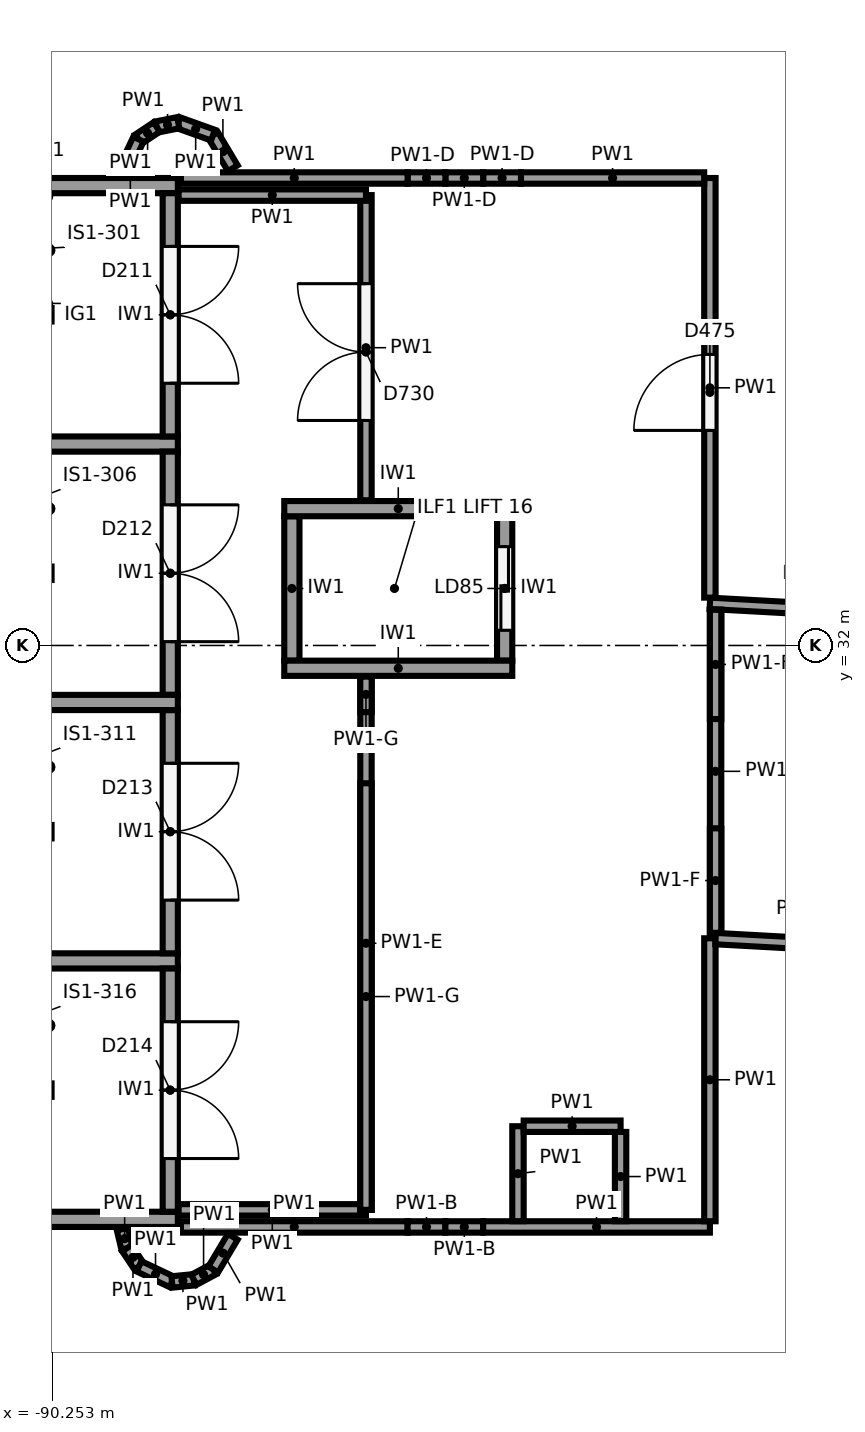
"""IFC4 building model, lengths in metres.
Left out: names, types, materials, properties, quantities, classifications, styles, units other than length and angle.
Written with IfcOpenShell. Run it as: python <this file> out.ifc"""

import sys

from ifc_helpers import new_model, si_unit, direction, frame, frame_2d, origin, origin_2d, place, context, subcontext, project, spatial, rectangle, circle, extrude, element, fill, save


model = new_model("IFC4")
c1 = context("Model", 3, precision=1e-05, world=origin(), true_north=direction((0.0, 1.0)))
c2 = subcontext(c1, "Body", "Model", "MODEL_VIEW")
j1 = project(units=[si_unit("LENGTHUNIT", "METRE"), si_unit("PLANEANGLEUNIT", "RADIAN")], contexts=[c1])
p1 = place(None, origin())
s1 = spatial("IfcSite", under=j1, at=p1, CompositionType="ELEMENT")
p2 = place(p1, origin())
s2 = spatial("IfcBuilding", under=s1, at=p2, CompositionType="ELEMENT")
p3 = place(p2, frame((0.0, 0.0, -4.0)))
s3 = spatial("IfcBuildingStorey", under=s2, at=p3, CompositionType="ELEMENT", Elevation=-4.0)
p4 = place(p3, frame((-84.941, 30.404, -1.2), z_axis=(0.0, 0.0, 1.0), x_axis=(1.0, 0.0, 0.0)))
e1 = element("IfcColumn", 1, at=p4, inside=s3, PredefinedType="COLUMN", context=c2, shape_type="SweptSolid", body=[
    extrude(circle(Radius=0.6, at=origin_2d()), origin(), (0.0, 0.0, 1.0), 5.2),
])
for number, where, z_axis, x_axis in (
    (2, (-97.6, 38.05, -1.2), (0.0, 0.0, 1.0), (1.0, 0.0, 0.0)),
    (3, (-97.6, 31.25, -1.2), (0.0, 0.0, 1.0), (1.0, 0.0, 0.0)),
    (4, (-97.6, 24.45, -1.2), (0.0, 0.0, 1.0), (1.0, 0.0, 0.0)),
    (5, (-97.6, 34.65, -1.2), (0.0, 0.0, 1.0), (1.0, 0.0, 0.0)),
    (6, (-97.6, 27.85, -1.2), (0.0, 0.0, 1.0), (1.0, 0.0, 0.0)),
):
    element("IfcWall", number, at=place(p3, frame(where, z_axis=z_axis, x_axis=x_axis)), inside=s3, PredefinedType="SHEAR", context=c2, shape_type="SweptSolid", body=[
        extrude(rectangle(XDim=9.0, YDim=0.2, at=frame_2d((4.5, 0.0))), origin(), (0.0, 0.0, 1.0), 4.8),
    ])
p5 = place(p3, frame((-88.7, 37.95, -1.2), z_axis=(0.0, 0.0, 1.0), x_axis=(0.0, -1.0, 0.0)))
e7 = element("IfcWall", 7, at=p5, inside=s3, PredefinedType="SHEAR", context=c2, shape_type="SweptSolid", body=[
    extrude(rectangle(XDim=3.2, YDim=0.2, at=frame_2d((1.6, 0.0))), origin(), (0.0, 0.0, 1.0), 4.8),
])
p6 = place(p5, frame((0.7, 0.0, 1.2)))
e8 = element("IfcOpeningElement", 8, at=p6, cuts=e7, PredefinedType="OPENING", context=c2, shape_type="SweptSolid", body=[
    extrude(rectangle(XDim=1.8, YDim=2.1, at=frame_2d((0.9, 1.05))), frame((0.0, 0.11, 0.0), z_axis=(0.0, -1.0, 0.0), x_axis=(1.0, 0.0, 0.0)), (0.0, 0.0, 1.0), 0.22),
])
p7 = place(p3, frame((-88.7, 34.55, -1.2), z_axis=(0.0, 0.0, 1.0), x_axis=(0.0, -1.0, 0.0)))
e9 = element("IfcWall", 9, at=p7, inside=s3, PredefinedType="SHEAR", context=c2, shape_type="SweptSolid", body=[
    extrude(rectangle(XDim=3.2, YDim=0.2, at=frame_2d((1.6, 0.0))), origin(), (0.0, 0.0, 1.0), 4.8),
])
p8 = place(p7, frame((0.7, 0.0, 1.2)))
e10 = element("IfcOpeningElement", 10, at=p8, cuts=e9, PredefinedType="OPENING", context=c2, shape_type="SweptSolid", body=[
    extrude(rectangle(XDim=1.8, YDim=2.1, at=frame_2d((0.9, 1.05))), frame((0.0, 0.11, 0.0), z_axis=(0.0, -1.0, 0.0), x_axis=(1.0, 0.0, 0.0)), (0.0, 0.0, 1.0), 0.22),
])
p9 = place(p3, frame((-88.7, 31.15, -1.2), z_axis=(0.0, 0.0, 1.0), x_axis=(0.0, -1.0, 0.0)))
e11 = element("IfcWall", 11, at=p9, inside=s3, PredefinedType="SHEAR", context=c2, shape_type="SweptSolid", body=[
    extrude(rectangle(XDim=3.2, YDim=0.2, at=frame_2d((1.6, 0.0))), origin(), (0.0, 0.0, 1.0), 4.8),
])
p10 = place(p9, frame((0.7, 0.0, 1.2)))
e12 = element("IfcOpeningElement", 12, at=p10, cuts=e11, PredefinedType="OPENING", context=c2, shape_type="SweptSolid", body=[
    extrude(rectangle(XDim=1.8, YDim=2.1, at=frame_2d((0.9, 1.05))), frame((0.0, 0.11, 0.0), z_axis=(0.0, -1.0, 0.0), x_axis=(1.0, 0.0, 0.0)), (0.0, 0.0, 1.0), 0.22),
])
p11 = place(p3, frame((-88.7, 27.75, -1.2), z_axis=(0.0, 0.0, 1.0), x_axis=(0.0, -1.0, 0.0)))
e13 = element("IfcWall", 13, at=p11, inside=s3, PredefinedType="SHEAR", context=c2, shape_type="SweptSolid", body=[
    extrude(rectangle(XDim=3.2, YDim=0.2, at=frame_2d((1.6, 0.0))), origin(), (0.0, 0.0, 1.0), 4.8),
])
p12 = place(p11, frame((0.7, 0.0, 1.2)))
e14 = element("IfcOpeningElement", 14, at=p12, cuts=e13, PredefinedType="OPENING", context=c2, shape_type="SweptSolid", body=[
    extrude(rectangle(XDim=1.8, YDim=2.1, at=frame_2d((0.9, 1.05))), frame((0.0, 0.11, 0.0), z_axis=(0.0, -1.0, 0.0), x_axis=(1.0, 0.0, 0.0)), (0.0, 0.0, 1.0), 0.22),
])
for number, where, z_axis, x_axis in (
    (15, (-87.2, 33.8, -1.2), (0.0, 0.0, 1.0), (1.0, 0.0, 0.0)),
    (16, (-87.2, 31.7, -1.2), (0.0, 0.0, 1.0), (1.0, 0.0, 0.0)),
):
    element("IfcWall", number, at=place(p3, frame(where, z_axis=z_axis, x_axis=x_axis)), inside=s3, PredefinedType="SHEAR", context=c2, shape_type="SweptSolid", body=[
        extrude(rectangle(XDim=3.0, YDim=0.2, at=frame_2d((1.5, 0.0))), origin(), (0.0, 0.0, 1.0), 4.8),
    ])
p13 = place(p3, frame((-87.1, 33.7, -1.2), z_axis=(0.0, 0.0, 1.0), x_axis=(0.0, -1.0, 0.0)))
e17 = element("IfcWall", 17, at=p13, inside=s3, PredefinedType="SHEAR", context=c2, shape_type="SweptSolid", body=[
    extrude(rectangle(XDim=1.9, YDim=0.2, at=frame_2d((0.95, 0.0))), origin(), (0.0, 0.0, 1.0), 4.8),
])
p14 = place(p3, frame((-84.3, 33.7, -1.2), z_axis=(0.0, 0.0, 1.0), x_axis=(0.0, -1.0, 0.0)))
e18 = element("IfcWall", 18, at=p14, inside=s3, PredefinedType="SHEAR", context=c2, shape_type="SweptSolid", body=[
    extrude(rectangle(XDim=1.9, YDim=0.2, at=frame_2d((0.95, 0.0))), origin(), (0.0, 0.0, 1.0), 4.8),
])
p15 = place(p14, frame((0.4, 0.0, 1.2)))
e19 = element("IfcOpeningElement", 19, at=p15, cuts=e18, PredefinedType="OPENING", context=c2, shape_type="SweptSolid", body=[
    extrude(rectangle(XDim=1.1, YDim=2.1, at=frame_2d((0.55, 1.05))), frame((0.0, 0.11, 0.0), z_axis=(0.0, -1.0, 0.0), x_axis=(1.0, 0.0, 0.0)), (0.0, 0.0, 1.0), 0.22),
])
p16 = place(p3, frame((-79.122, 32.418, 0.0), z_axis=(0.0, 0.0, 1.0), x_axis=(-0.998497362752, 0.05479978629, 0.0)))
e20 = element("IfcWall", 20, at=p16, inside=s3, PredefinedType="PARTITIONING", context=c2, shape_type="SweptSolid", body=[
    extrude(rectangle(XDim=2.481, YDim=0.15, at=frame_2d((1.241, 0.0))), origin(), (0.0, 0.0, 1.0), 3.6),
])
p17 = place(p3, frame((-81.6, 32.629, 0.0), z_axis=(0.0, 0.0, 1.0), x_axis=(0.0, 1.0, 0.0)))
e21 = element("IfcWall", 21, at=p17, inside=s3, PredefinedType="PARTITIONING", context=c2, shape_type="SweptSolid", body=[
    extrude(rectangle(XDim=5.521, YDim=0.15, at=frame_2d((2.76, 0.0))), origin(), (0.0, 0.0, 1.0), 3.6),
])
p18 = place(p17, frame((2.2, 0.0, 0.0)))
e22 = element("IfcOpeningElement", 22, at=p18, cuts=e21, PredefinedType="OPENING", context=c2, shape_type="SweptSolid", body=[
    extrude(rectangle(XDim=1.0, YDim=2.1, at=frame_2d((0.5, 1.05))), frame((0.0, 0.085, 0.0), z_axis=(0.0, -1.0, 0.0), x_axis=(1.0, 0.0, 0.0)), (0.0, 0.0, 1.0), 0.17),
])
p19 = place(p3, frame((-81.675, 38.15, 0.0), z_axis=(0.0, 0.0, 1.0), x_axis=(-1.0, 0.0, 0.0)))
e23 = element("IfcWall", 23, at=p19, inside=s3, PredefinedType="PARTITIONING", context=c2, shape_type="SweptSolid", body=[
    extrude(rectangle(XDim=2.411, YDim=0.15, at=frame_2d((1.205, 0.0))), origin(), (0.0, 0.0, 1.0), 3.6),
])
p20 = place(p3, frame((-84.086, 38.15, 0.0), z_axis=(0.0, 0.0, 1.0), x_axis=(-1.0, 0.0, 0.0)))
e24 = element("IfcWall", 24, at=p20, inside=s3, PredefinedType="PARTITIONING", context=c2, shape_type="SweptSolid", body=[
    extrude(rectangle(XDim=0.497, YDim=0.15, at=frame_2d((0.249, 0.0))), origin(), (0.0, 0.0, 1.0), 2.3),
])
for number, where, z_axis, x_axis in (
    (25, (-84.583, 38.15, 0.0), (0.0, 0.0, 1.0), (-1.0, 0.0, 0.0)),
    (26, (-85.08, 38.15, 0.0), (0.0, 0.0, 1.0), (-1.0, 0.0, 0.0)),
):
    element("IfcWall", number, at=place(p3, frame(where, z_axis=z_axis, x_axis=x_axis)), inside=s3, PredefinedType="PARTITIONING", context=c2, shape_type="SweptSolid", body=[
        extrude(rectangle(XDim=0.497, YDim=0.15, at=frame_2d((0.249, 0.0))), origin(), (0.0, 0.0, 1.0), 2.3),
    ])
for number, where, z_axis, x_axis in (
    (27, (-85.577, 38.15, 0.0), (0.0, 0.0, 1.0), (-1.0, 0.0, 0.0)),
    (28, (-88.56, 24.35, 0.0), (0.0, 0.0, 1.0), (1.0, 0.0, 0.0)),
):
    element("IfcWall", number, at=place(p3, frame(where, z_axis=z_axis, x_axis=x_axis)), inside=s3, PredefinedType="PARTITIONING", context=c2, shape_type="SweptSolid", body=[
        extrude(rectangle(XDim=2.983, YDim=0.15, at=frame_2d((1.491, 0.0))), origin(), (0.0, 0.0, 1.0), 3.6),
    ])
for number, where, z_axis, x_axis in (
    (29, (-85.577, 24.35, 0.0), (0.0, 0.0, 1.0), (1.0, 0.0, 0.0)),
    (30, (-85.08, 24.35, 0.0), (0.0, 0.0, 1.0), (1.0, 0.0, 0.0)),
):
    element("IfcWall", number, at=place(p3, frame(where, z_axis=z_axis, x_axis=x_axis)), inside=s3, PredefinedType="PARTITIONING", context=c2, shape_type="SweptSolid", body=[
        extrude(rectangle(XDim=0.497, YDim=0.15, at=frame_2d((0.249, 0.0))), origin(), (0.0, 0.0, 1.0), 2.5),
    ])
p21 = place(p3, frame((-84.583, 24.35, 0.0), z_axis=(0.0, 0.0, 1.0), x_axis=(1.0, 0.0, 0.0)))
e31 = element("IfcWall", 31, at=p21, inside=s3, PredefinedType="PARTITIONING", context=c2, shape_type="SweptSolid", body=[
    extrude(rectangle(XDim=2.983, YDim=0.15, at=frame_2d((1.491, 0.0))), origin(), (0.0, 0.0, 1.0), 3.6),
])
p22 = place(p3, frame((-81.6, 24.425, 0.0), z_axis=(0.0, 0.0, 1.0), x_axis=(0.0, 1.0, 0.0)))
e32 = element("IfcWall", 32, at=p22, inside=s3, PredefinedType="PARTITIONING", context=c2, shape_type="SweptSolid", body=[
    extrude(rectangle(XDim=3.723, YDim=0.15, at=frame_2d((1.861, 0.0))), origin(), (0.0, 0.0, 1.0), 3.6),
])
p23 = place(p3, frame((-81.525, 28.144, 0.0), z_axis=(0.0, 0.0, 1.0), x_axis=(0.998497253929, -0.054801769103, 0.0)))
e33 = element("IfcWall", 33, at=p23, inside=s3, PredefinedType="PARTITIONING", context=c2, shape_type="SweptSolid", body=[
    extrude(rectangle(XDim=2.165, YDim=0.15, at=frame_2d((1.083, 0.0))), origin(), (0.0, 0.0, 1.0), 3.6),
])
p24 = place(p3, frame((-84.125, 25.675, 0.0), z_axis=(0.0, 0.0, 1.0), x_axis=(0.0, -1.0, 0.0)))
e34 = element("IfcWall", 34, at=p24, inside=s3, PredefinedType="PARTITIONING", context=c2, shape_type="SweptSolid", body=[
    extrude(rectangle(XDim=1.249, YDim=0.15, at=frame_2d((0.625, 0.0))), origin(), (0.0, 0.0, 1.0), 3.6),
])
p25 = place(p3, frame((-82.775, 24.426, 0.0), z_axis=(0.0, 0.0, 1.0), x_axis=(0.0, 1.0, 0.0)))
e35 = element("IfcWall", 35, at=p25, inside=s3, PredefinedType="PARTITIONING", context=c2, shape_type="SweptSolid", body=[
    extrude(rectangle(XDim=1.174, YDim=0.15, at=frame_2d((0.587, 0.0))), origin(), (0.0, 0.0, 1.0), 3.6),
])
p26 = place(p3, frame((-82.775, 25.675, 0.0), z_axis=(0.0, 0.0, 1.0), x_axis=(-1.0, 0.0, 0.0)))
e36 = element("IfcWall", 36, at=p26, inside=s3, PredefinedType="PARTITIONING", context=c2, shape_type="SweptSolid", body=[
    extrude(rectangle(XDim=1.275, YDim=0.15, at=frame_2d((0.638, 0.0))), origin(), (0.0, 0.0, 1.0), 3.6),
])
p27 = place(p3, frame((-88.59, 24.575, 0.0), z_axis=(0.0, 0.0, 1.0), x_axis=(1.0, 0.0, 0.0)))
e37 = element("IfcWall", 37, at=p27, inside=s3, PredefinedType="PARTITIONING", context=c2, shape_type="SweptSolid", body=[
    extrude(rectangle(XDim=2.465, YDim=0.15, at=frame_2d((1.232, 0.0))), origin(), (0.0, 0.0, 1.0), 3.6),
])
p28 = place(p3, frame((-86.125, 24.575, 0.0), z_axis=(0.0, 0.0, 1.0), x_axis=(0.0, 1.0, 0.0)))
e38 = element("IfcWall", 38, at=p28, inside=s3, PredefinedType="PARTITIONING", context=c2, shape_type="SweptSolid", body=[
    extrude(rectangle(XDim=7.015, YDim=0.15, at=frame_2d((3.508, 0.0))), origin(), (0.0, 0.0, 1.0), 2.85),
])
p29 = place(p3, frame((-86.125, 24.575, 2.85), z_axis=(0.0, 0.0, 1.0), x_axis=(0.0, 1.0, 0.0)))
e39 = element("IfcWall", 39, at=p29, inside=s3, PredefinedType="PARTITIONING", context=c2, shape_type="SweptSolid", body=[
    extrude(rectangle(XDim=5.612, YDim=0.15, at=frame_2d((2.806, 0.0))), origin(), (0.0, 0.0, 1.0), 0.75),
])
p30 = place(p3, frame((-86.125, 31.122, 2.85), z_axis=(0.0, 0.0, 1.0), x_axis=(0.0, 1.0, 0.0)))
e40 = element("IfcWall", 40, at=p30, inside=s3, PredefinedType="PARTITIONING", context=c2, shape_type="SweptSolid", body=[
    extrude(rectangle(XDim=0.468, YDim=0.15, at=frame_2d((0.234, 0.0))), origin(), (0.0, 0.0, 1.0), 0.75),
])
p31 = place(p3, frame((-86.125, 33.91, 0.0), z_axis=(0.0, 0.0, 1.0), x_axis=(0.0, 1.0, 0.0)))
e41 = element("IfcWall", 41, at=p31, inside=s3, PredefinedType="PARTITIONING", context=c2, shape_type="SweptSolid", body=[
    extrude(rectangle(XDim=4.015, YDim=0.15, at=frame_2d((2.008, 0.0))), origin(), (0.0, 0.0, 1.0), 3.6),
])
p32 = place(p31, frame((1.05, 0.0, 0.0)))
e42 = element("IfcOpeningElement", 42, at=p32, cuts=e41, PredefinedType="OPENING", context=c2, shape_type="SweptSolid", body=[
    extrude(rectangle(XDim=1.8, YDim=2.1, at=frame_2d((0.9, 1.05))), frame((0.0, 0.085, 0.0), z_axis=(0.0, -1.0, 0.0), x_axis=(1.0, 0.0, 0.0)), (0.0, 0.0, 1.0), 0.17),
])
p33 = place(p3, frame((-86.125, 37.925, 0.0), z_axis=(0.0, 0.0, 1.0), x_axis=(-1.0, 0.0, 0.0)))
e43 = element("IfcWall", 43, at=p33, inside=s3, PredefinedType="PARTITIONING", context=c2, shape_type="SweptSolid", body=[
    extrude(rectangle(XDim=2.465, YDim=0.15, at=frame_2d((1.232, 0.0))), origin(), (0.0, 0.0, 1.0), 3.6),
])
p34 = place(p3, frame((-89.33, 24.322, 0.0), z_axis=(0.0, 0.0, 1.0), x_axis=(0.230253879357, -0.973130593004, 0.0)))
e44 = element("IfcWall", 44, at=p34, inside=s3, PredefinedType="PARTITIONING", context=c2, shape_type="SweptSolid", body=[
    extrude(rectangle(XDim=0.258, YDim=0.15, at=frame_2d((0.129, 0.0))), origin(), (0.0, 0.0, 1.0), 3.6),
])
p35 = place(p3, frame((-89.271, 24.071, 0.0), z_axis=(0.0, 0.0, 1.0), x_axis=(0.555678694372, -0.831397130511, 0.0)))
e45 = element("IfcWall", 45, at=p35, inside=s3, PredefinedType="PARTITIONING", context=c2, shape_type="SweptSolid", body=[
    extrude(rectangle(XDim=0.288, YDim=0.15, at=frame_2d((0.144, 0.0))), origin(), (0.0, 0.0, 1.0), 3.6),
])
p36 = place(p3, frame((-89.111, 23.832, 0.0), z_axis=(0.0, 0.0, 1.0), x_axis=(0.90398642908, -0.427561148889, 0.0)))
e46 = element("IfcWall", 46, at=p36, inside=s3, PredefinedType="PARTITIONING", context=c2, shape_type="SweptSolid", body=[
    extrude(rectangle(XDim=0.48, YDim=0.15, at=frame_2d((0.24, 0.0))), origin(), (0.0, 0.0, 1.0), 3.6),
])
for number, where, z_axis, x_axis in (
    (47, (-88.677, 23.626, 0.0), (0.0, 0.0, 1.0), (0.995, 0.098, 0.0)),
    (48, (-88.389, 23.655, 0.0), (0.0, 0.0, 1.0), (0.882, 0.472, 0.0)),
):
    element("IfcWall", number, at=place(p3, frame(where, z_axis=z_axis, x_axis=x_axis)), inside=s3, PredefinedType="PARTITIONING", context=c2, shape_type="SweptSolid", body=[
        extrude(rectangle(XDim=0.289, YDim=0.15, at=frame_2d((0.145, 0.0))), origin(), (0.0, 0.0, 1.0), 3.6),
    ])
p37 = place(p3, frame((-88.134, 23.791, 0.0), z_axis=(0.0, 0.0, 1.0), x_axis=(0.513060623194, 0.858352373404, 0.0)))
e49 = element("IfcWall", 49, at=p37, inside=s3, PredefinedType="PARTITIONING", context=c2, shape_type="SweptSolid", body=[
    extrude(rectangle(XDim=0.5, YDim=0.15, at=frame_2d((0.25, 0.0))), origin(), (0.0, 0.0, 1.0), 3.6),
])
p38 = place(p3, frame((-81.525, 28.219, 0.0), z_axis=(0.0, 0.0, 1.0), x_axis=(0.0, 1.0, 0.0)))
e50 = element("IfcWall", 50, at=p38, inside=s3, PredefinedType="PARTITIONING", context=c2, shape_type="SweptSolid", body=[
    extrude(rectangle(XDim=4.25, YDim=0.15, at=frame_2d((2.125, 0.0))), origin(), (0.0, 0.0, 1.0), 2.5),
])
p39 = place(p3, frame((-81.525, 28.219, 2.5), z_axis=(0.0, 0.0, 1.0), x_axis=(0.0, 1.0, 0.0)))
e51 = element("IfcWall", 51, at=p39, inside=s3, PredefinedType="PARTITIONING", context=c2, shape_type="SweptSolid", body=[
    extrude(rectangle(XDim=1.375, YDim=0.15, at=frame_2d((0.688, 0.0))), origin(), (0.0, 0.0, 1.0), 1.1),
])
p40 = place(p3, frame((-81.525, 31.032, 2.5), z_axis=(0.0, 0.0, 1.0), x_axis=(0.0, 1.0, 0.0)))
e52 = element("IfcWall", 52, at=p40, inside=s3, PredefinedType="PARTITIONING", context=c2, shape_type="SweptSolid", body=[
    extrude(rectangle(XDim=1.437, YDim=0.15, at=frame_2d((0.719, 0.0))), origin(), (0.0, 0.0, 1.0), 1.1),
])
p41 = place(p3, frame((-87.877, 38.279, 0.0), z_axis=(0.0, 0.0, 1.0), x_axis=(-0.513007387301, 0.858384191709, 0.0)))
e53 = element("IfcWall", 53, at=p41, inside=s3, PredefinedType="PARTITIONING", context=c2, shape_type="SweptSolid", body=[
    extrude(rectangle(XDim=0.507, YDim=0.15, at=frame_2d((0.253, 0.0))), origin(), (0.0, 0.0, 1.0), 3.6),
])
p42 = place(p3, frame((-88.137, 38.714, 0.0), z_axis=(0.0, 0.0, 1.0), x_axis=(-0.941514118829, 0.33697353612, 0.0)))
e54 = element("IfcWall", 54, at=p42, inside=s3, PredefinedType="PARTITIONING", context=c2, shape_type="SweptSolid", body=[
    extrude(rectangle(XDim=0.485, YDim=0.15, at=frame_2d((0.243, 0.0))), origin(), (0.0, 0.0, 1.0), 3.6),
])
p43 = place(p3, frame((-88.594, 38.878, 0.0), z_axis=(0.0, 0.0, 1.0), x_axis=(-0.980677850921, -0.195629631482, 0.0)))
e55 = element("IfcWall", 55, at=p43, inside=s3, PredefinedType="PARTITIONING", context=c2, shape_type="SweptSolid", body=[
    extrude(rectangle(XDim=0.29, YDim=0.15, at=frame_2d((0.145, 0.0))), origin(), (0.0, 0.0, 1.0), 3.6),
])
p44 = place(p3, frame((-88.878, 38.821, 0.0), z_axis=(0.0, 0.0, 1.0), x_axis=(-0.831269669455, -0.555869352136, 0.0)))
e56 = element("IfcWall", 56, at=p44, inside=s3, PredefinedType="PARTITIONING", context=c2, shape_type="SweptSolid", body=[
    extrude(rectangle(XDim=0.289, YDim=0.15, at=frame_2d((0.145, 0.0))), origin(), (0.0, 0.0, 1.0), 3.6),
])
p45 = place(p3, frame((-89.118, 38.66, 0.0), z_axis=(0.0, 0.0, 1.0), x_axis=(-0.427917965102, -0.903817578465, 0.0)))
e57 = element("IfcWall", 57, at=p45, inside=s3, PredefinedType="PARTITIONING", context=c2, shape_type="SweptSolid", body=[
    extrude(rectangle(XDim=0.499, YDim=0.15, at=frame_2d((0.249, 0.0))), origin(), (0.0, 0.0, 1.0), 3.6),
])
p46 = place(p6, origin())
e58 = element("IfcDoor", 58, at=p46, inside=s3, OperationType="DOUBLE_DOOR_SINGLE_SWING", PredefinedType="DOOR", context=c2, shape_type="SweptSolid", body=[
    extrude(rectangle(XDim=1.8, YDim=2.1, at=frame_2d((0.9, 1.05))), frame((0.0, 0.025, 0.0), z_axis=(0.0, -1.0, 0.0), x_axis=(1.0, 0.0, 0.0)), (0.0, 0.0, 1.0), 0.05),
])
fill(e8, e58)
p47 = place(p8, origin())
e59 = element("IfcDoor", 59, at=p47, inside=s3, OperationType="DOUBLE_DOOR_SINGLE_SWING", PredefinedType="DOOR", context=c2, shape_type="SweptSolid", body=[
    extrude(rectangle(XDim=1.8, YDim=2.1, at=frame_2d((0.9, 1.05))), frame((0.0, 0.025, 0.0), z_axis=(0.0, -1.0, 0.0), x_axis=(1.0, 0.0, 0.0)), (0.0, 0.0, 1.0), 0.05),
])
fill(e10, e59)
p48 = place(p10, origin())
e60 = element("IfcDoor", 60, at=p48, inside=s3, OperationType="DOUBLE_DOOR_SINGLE_SWING", PredefinedType="DOOR", context=c2, shape_type="SweptSolid", body=[
    extrude(rectangle(XDim=1.8, YDim=2.1, at=frame_2d((0.9, 1.05))), frame((0.0, 0.025, 0.0), z_axis=(0.0, -1.0, 0.0), x_axis=(1.0, 0.0, 0.0)), (0.0, 0.0, 1.0), 0.05),
])
fill(e12, e60)
p49 = place(p12, origin())
e61 = element("IfcDoor", 61, at=p49, inside=s3, OperationType="DOUBLE_DOOR_SINGLE_SWING", PredefinedType="DOOR", context=c2, shape_type="SweptSolid", body=[
    extrude(rectangle(XDim=1.8, YDim=2.1, at=frame_2d((0.9, 1.05))), frame((0.0, 0.025, 0.0), z_axis=(0.0, -1.0, 0.0), x_axis=(1.0, 0.0, 0.0)), (0.0, 0.0, 1.0), 0.05),
])
fill(e14, e61)
p50 = place(p15, origin())
e62 = element("IfcDoor", 62, at=p50, inside=s3, OperationType="SLIDING_TO_LEFT", PredefinedType="DOOR", context=c2, shape_type="SweptSolid", body=[
    extrude(rectangle(XDim=1.1, YDim=2.1, at=frame_2d((0.55, 1.05))), frame((0.0, 0.025, 0.0), z_axis=(0.0, -1.0, 0.0), x_axis=(1.0, 0.0, 0.0)), (0.0, 0.0, 1.0), 0.05),
])
fill(e19, e62)
p51 = place(p18, origin())
e63 = element("IfcDoor", 63, at=p51, inside=s3, OperationType="SINGLE_SWING_LEFT", PredefinedType="DOOR", context=c2, shape_type="SweptSolid", body=[
    extrude(rectangle(XDim=1.0, YDim=2.1, at=frame_2d((0.5, 1.05))), frame((0.0, 0.025, 0.0), z_axis=(0.0, -1.0, 0.0), x_axis=(1.0, 0.0, 0.0)), (0.0, 0.0, 1.0), 0.05),
])
fill(e22, e63)
p52 = place(p32, origin())
e64 = element("IfcDoor", 64, at=p52, inside=s3, OperationType="DOUBLE_DOOR_SINGLE_SWING", PredefinedType="DOOR", context=c2, shape_type="SweptSolid", body=[
    extrude(rectangle(XDim=1.8, YDim=2.1, at=frame_2d((0.9, 1.05))), frame((0.0, 0.025, 0.0), z_axis=(0.0, -1.0, 0.0), x_axis=(1.0, 0.0, 0.0)), (0.0, 0.0, 1.0), 0.05),
])
fill(e42, e64)
save(model, sys.argv[1])
